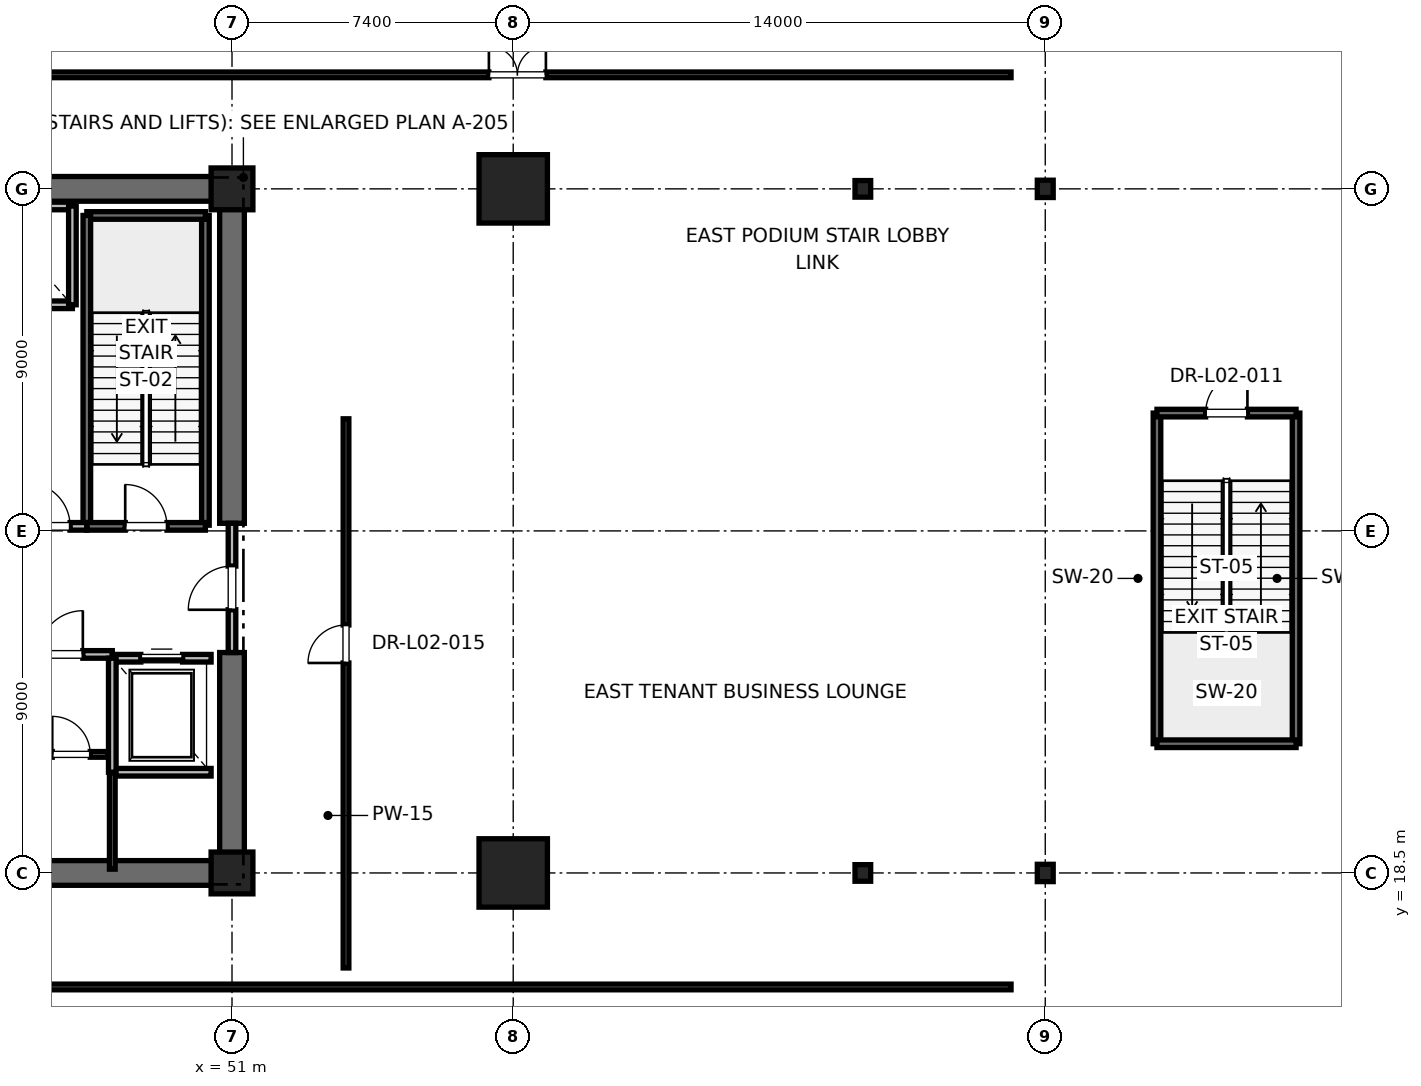
"""IFC4 building model, lengths in metres.
Left out: names, types, materials, properties, quantities, classifications, styles, units other than length and angle.
Written with IfcOpenShell. Run it as: python <this file> out.ifc"""

import sys

from ifc_helpers import new_model, si_unit, direction, frame, frame_2d, origin, origin_2d, place, context, subcontext, project, spatial, rectangle, i_section, extrude, element, fill, save


model = new_model("IFC4")
c1 = context("Model", 3, precision=1e-05, world=origin(), true_north=direction((0.0, 1.0)))
c2 = subcontext(c1, "Body", "Model", "MODEL_VIEW")
j1 = project(units=[si_unit("LENGTHUNIT", "METRE"), si_unit("PLANEANGLEUNIT", "RADIAN")], contexts=[c1])
p1 = place(None, origin())
s1 = spatial("IfcSite", under=j1, at=p1, CompositionType="ELEMENT")
p2 = place(p1, origin())
s2 = spatial("IfcBuilding", under=s1, at=p2, CompositionType="ELEMENT")
p3 = place(p2, frame((0.0, 0.0, 11.2)))
s3 = spatial("IfcBuildingStorey", under=s2, at=p3, CompositionType="ELEMENT", Elevation=11.2)
for number, where, z_axis, x_axis in (
    (1, (58.4, 18.5, 0.0), (0.0, 0.0, 1.0), (1.0, 0.0, 0.0)),
    (2, (58.4, 36.5, 0.0), (0.0, 0.0, 1.0), (1.0, 0.0, 0.0)),
):
    element("IfcColumn", number, at=place(p3, frame(where, z_axis=z_axis, x_axis=x_axis)), inside=s3, PredefinedType="COLUMN", context=c2, shape_type="SweptSolid", body=[
        extrude(rectangle(XDim=1.8, YDim=1.8, at=origin_2d()), origin(), (0.0, 0.0, 1.0), 5.2),
    ])
for number, where, z_axis, x_axis in (
    (3, (67.6, 18.5, 0.0), (0.0, 0.0, 1.0), (1.0, 0.0, 0.0)),
    (4, (67.6, 36.5, 0.0), (0.0, 0.0, 1.0), (1.0, 0.0, 0.0)),
):
    element("IfcColumn", number, at=place(p3, frame(where, z_axis=z_axis, x_axis=x_axis)), inside=s3, PredefinedType="COLUMN", context=c2, shape_type="SweptSolid", body=[
        extrude(i_section(OverallWidth=0.412, OverallDepth=0.437, WebThickness=0.036, FlangeThickness=0.058, FilletRadius=0.015, at=origin_2d()), origin(), (0.0, 0.0, 1.0), 5.2),
    ])
for number, where, z_axis, x_axis in (
    (5, (51.0, 18.5, 0.0), (0.0, 0.0, 1.0), (1.0, 0.0, 0.0)),
    (6, (51.0, 36.5, 0.0), (0.0, 0.0, 1.0), (1.0, 0.0, 0.0)),
):
    element("IfcColumn", number, at=place(p3, frame(where, z_axis=z_axis, x_axis=x_axis)), inside=s3, PredefinedType="PILASTER", context=c2, shape_type="SweptSolid", body=[
        extrude(rectangle(XDim=1.1, YDim=1.1, at=origin_2d()), origin(), (0.0, 0.0, 1.0), 5.2),
    ])
for number, where, z_axis, x_axis in (
    (7, (72.4, 18.5, 0.0), (0.0, 0.0, 1.0), (1.0, 0.0, 0.0)),
    (8, (72.4, 36.5, 0.0), (0.0, 0.0, 1.0), (1.0, 0.0, 0.0)),
):
    element("IfcColumn", number, at=place(p3, frame(where, z_axis=z_axis, x_axis=x_axis)), inside=s3, PredefinedType="COLUMN", context=c2, shape_type="SweptSolid", body=[
        extrude(i_section(OverallWidth=0.418, OverallDepth=0.456, WebThickness=0.042, FlangeThickness=0.067, FilletRadius=0.015, at=origin_2d()), origin(), (0.0, 0.0, 1.0), 5.2),
    ])
p4 = place(p3, frame((41.8, 18.5, 0.0), z_axis=(0.0, 0.0, 1.0), x_axis=(1.0, 0.0, 0.0)))
e9 = element("IfcWall", 9, at=p4, inside=s3, PredefinedType="SHEAR", context=c2, shape_type="SweptSolid", body=[
    extrude(rectangle(XDim=9.2, YDim=0.65, at=frame_2d((4.6, 0.0))), origin(), (0.0, 0.0, 1.0), 4.92),
])
for number, where, z_axis, x_axis in (
    (10, (45.2, 36.5, 0.0), (0.0, 0.0, 1.0), (1.0, 0.0, 0.0)),
    (11, (51.0, 18.5, 0.0), (0.0, 0.0, 1.0), (0.0, 1.0, 0.0)),
):
    element("IfcWall", number, at=place(p3, frame(where, z_axis=z_axis, x_axis=x_axis)), inside=s3, PredefinedType="SHEAR", context=c2, shape_type="SweptSolid", body=[
        extrude(rectangle(XDim=5.8, YDim=0.65, at=frame_2d((2.9, 0.0))), origin(), (0.0, 0.0, 1.0), 4.92),
    ])
p5 = place(p3, frame((51.0, 27.7, 0.0), z_axis=(0.0, 0.0, 1.0), x_axis=(0.0, 1.0, 0.0)))
e12 = element("IfcWall", 12, at=p5, inside=s3, PredefinedType="SHEAR", context=c2, shape_type="SweptSolid", body=[
    extrude(rectangle(XDim=8.8, YDim=0.65, at=frame_2d((4.4, 0.0))), origin(), (0.0, 0.0, 1.0), 4.92),
])
p6 = place(p3, frame((50.3, 27.65, 0.0), z_axis=(0.0, 0.0, 1.0), x_axis=(0.0, 1.0, 0.0)))
e13 = element("IfcWall", 13, at=p6, inside=s3, PredefinedType="SOLIDWALL", context=c2, shape_type="SweptSolid", body=[
    extrude(rectangle(XDim=8.15, YDim=0.2, at=frame_2d((4.075, 0.0))), origin(), (0.0, 0.0, 1.0), 4.92),
])
p7 = place(p3, frame((47.18, 35.8, 0.0), z_axis=(0.0, 0.0, 1.0), x_axis=(1.0, 0.0, 0.0)))
e14 = element("IfcWall", 14, at=p7, inside=s3, PredefinedType="SOLIDWALL", context=c2, shape_type="SweptSolid", body=[
    extrude(rectangle(XDim=3.12, YDim=0.2, at=frame_2d((1.56, 0.0))), origin(), (0.0, 0.0, 1.0), 4.92),
])
p8 = place(p3, frame((47.18, 27.62, 0.0), z_axis=(0.0, 0.0, 1.0), x_axis=(0.0, 1.0, 0.0)))
e15 = element("IfcWall", 15, at=p8, inside=s3, PredefinedType="SOLIDWALL", context=c2, shape_type="SweptSolid", body=[
    extrude(rectangle(XDim=8.18, YDim=0.2, at=frame_2d((4.09, 0.0))), origin(), (0.0, 0.0, 1.0), 4.92),
])
p9 = place(p3, frame((47.18, 27.62, 0.0), z_axis=(0.0, 0.0, 1.0), x_axis=(1.0, 0.0, 0.0)))
e16 = element("IfcWall", 16, at=p9, inside=s3, PredefinedType="SOLIDWALL", context=c2, shape_type="SweptSolid", body=[
    extrude(rectangle(XDim=3.12, YDim=0.2, at=frame_2d((1.56, 0.0))), origin(), (0.0, 0.0, 1.0), 4.92),
])
p10 = place(p9, frame((1.01, 0.0, 0.0)))
e17 = element("IfcOpeningElement", 17, at=p10, cuts=e16, PredefinedType="OPENING", context=c2, shape_type="SweptSolid", body=[
    extrude(rectangle(XDim=1.1, YDim=2.15, at=frame_2d((0.55, 1.075))), frame((0.0, 0.1, 0.0), z_axis=(0.0, -1.0, 0.0), x_axis=(1.0, 0.0, 0.0)), (0.0, 0.0, 1.0), 0.2),
])
for number, where, z_axis, x_axis in (
    (18, (75.34, 21.9, 0.0), (0.0, 0.0, 1.0), (0.0, 1.0, 0.0)),
    (19, (79.0, 21.9, 0.0), (0.0, 0.0, 1.0), (0.0, 1.0, 0.0)),
):
    element("IfcWall", number, at=place(p3, frame(where, z_axis=z_axis, x_axis=x_axis)), inside=s3, PredefinedType="SOLIDWALL", context=c2, shape_type="SweptSolid", body=[
        extrude(rectangle(XDim=8.7, YDim=0.2, at=frame_2d((4.35, 0.0))), origin(), (0.0, 0.0, 1.0), 4.92),
    ])
p11 = place(p3, frame((75.34, 30.6, 0.0), z_axis=(0.0, 0.0, 1.0), x_axis=(1.0, 0.0, 0.0)))
e20 = element("IfcWall", 20, at=p11, inside=s3, PredefinedType="SOLIDWALL", context=c2, shape_type="SweptSolid", body=[
    extrude(rectangle(XDim=3.66, YDim=0.2, at=frame_2d((1.83, 0.0))), origin(), (0.0, 0.0, 1.0), 4.92),
])
p12 = place(p11, frame((1.28, 0.0, 0.0)))
e21 = element("IfcOpeningElement", 21, at=p12, cuts=e20, PredefinedType="OPENING", context=c2, shape_type="SweptSolid", body=[
    extrude(rectangle(XDim=1.1, YDim=2.15, at=frame_2d((0.55, 1.075))), frame((0.0, 0.1, 0.0), z_axis=(0.0, -1.0, 0.0), x_axis=(1.0, 0.0, 0.0)), (0.0, 0.0, 1.0), 0.2),
])
p13 = place(p3, frame((75.34, 21.9, 0.0), z_axis=(0.0, 0.0, 1.0), x_axis=(1.0, 0.0, 0.0)))
e22 = element("IfcWall", 22, at=p13, inside=s3, PredefinedType="SOLIDWALL", context=c2, shape_type="SweptSolid", body=[
    extrude(rectangle(XDim=3.66, YDim=0.2, at=frame_2d((1.83, 0.0))), origin(), (0.0, 0.0, 1.0), 4.92),
])
p14 = place(p3, frame((45.15, 24.25, 0.0), z_axis=(0.0, 0.0, 1.0), x_axis=(1.0, 0.0, 0.0)))
e23 = element("IfcWall", 23, at=p14, inside=s3, PredefinedType="PARTITIONING", context=c2, shape_type="SweptSolid", body=[
    extrude(rectangle(XDim=2.7, YDim=0.2, at=frame_2d((1.35, 0.0))), origin(), (0.0, 0.0, 1.0), 4.92),
])
p15 = place(p14, frame((0.775, 0.0, 0.0)))
e24 = element("IfcOpeningElement", 24, at=p15, cuts=e23, PredefinedType="OPENING", context=c2, shape_type="SweptSolid", body=[
    extrude(rectangle(XDim=1.15, YDim=2.2, at=frame_2d((0.575, 1.1))), frame((0.0, 0.1, 0.0), z_axis=(0.0, -1.0, 0.0), x_axis=(1.0, 0.0, 0.0)), (0.0, 0.0, 1.0), 0.2),
])
p16 = place(p3, frame((45.15, 27.62, 0.0), z_axis=(0.0, 0.0, 1.0), x_axis=(1.0, 0.0, 0.0)))
e25 = element("IfcWall", 25, at=p16, inside=s3, PredefinedType="PARTITIONING", context=c2, shape_type="SweptSolid", body=[
    extrude(rectangle(XDim=2.03, YDim=0.2, at=frame_2d((1.015, 0.0))), origin(), (0.0, 0.0, 1.0), 4.92),
])
p17 = place(p16, frame((0.44, 0.0, 0.0)))
e26 = element("IfcOpeningElement", 26, at=p17, cuts=e25, PredefinedType="OPENING", context=c2, shape_type="SweptSolid", body=[
    extrude(rectangle(XDim=1.15, YDim=2.2, at=frame_2d((0.575, 1.1))), frame((0.0, 0.1, 0.0), z_axis=(0.0, -1.0, 0.0), x_axis=(1.0, 0.0, 0.0)), (0.0, 0.0, 1.0), 0.2),
])
p18 = place(p3, frame((51.0, 24.3, 0.0), z_axis=(0.0, 0.0, 1.0), x_axis=(0.0, 1.0, 0.0)))
e27 = element("IfcWall", 27, at=p18, inside=s3, PredefinedType="PARTITIONING", context=c2, shape_type="SweptSolid", body=[
    extrude(rectangle(XDim=3.4, YDim=0.2, at=frame_2d((1.7, 0.0))), origin(), (0.0, 0.0, 1.0), 3.7),
])
p19 = place(p18, frame((1.125, 0.0, 0.0)))
e28 = element("IfcOpeningElement", 28, at=p19, cuts=e27, PredefinedType="OPENING", context=c2, shape_type="SweptSolid", body=[
    extrude(rectangle(XDim=1.15, YDim=2.2, at=frame_2d((0.575, 1.1))), frame((0.0, 0.1, 0.0), z_axis=(0.0, -1.0, 0.0), x_axis=(1.0, 0.0, 0.0)), (0.0, 0.0, 1.0), 0.2),
])
p20 = place(p3, frame((47.85, 21.15, 0.0), z_axis=(0.0, 0.0, 1.0), x_axis=(1.0, 0.0, 0.0)))
e29 = element("IfcWall", 29, at=p20, inside=s3, PredefinedType="SOLIDWALL", context=c2, shape_type="SweptSolid", body=[
    extrude(rectangle(XDim=2.6, YDim=0.2, at=frame_2d((1.3, 0.0))), origin(), (0.0, 0.0, 1.0), 4.92),
])
p21 = place(p3, frame((50.45, 24.15, 0.0), z_axis=(0.0, 0.0, 1.0), x_axis=(-1.0, 0.0, 0.0)))
e30 = element("IfcWall", 30, at=p21, inside=s3, PredefinedType="SOLIDWALL", context=c2, shape_type="SweptSolid", body=[
    extrude(rectangle(XDim=2.6, YDim=0.2, at=frame_2d((1.3, 0.0))), origin(), (0.0, 0.0, 1.0), 3.7),
])
p22 = place(p21, frame((0.75, 0.0, 0.0)))
e31 = element("IfcOpeningElement", 31, at=p22, cuts=e30, PredefinedType="OPENING", context=c2, shape_type="SweptSolid", body=[
    extrude(rectangle(XDim=1.1, YDim=2.2, at=frame_2d((0.55, 1.1))), frame((0.0, 0.1, 0.0), z_axis=(0.0, -1.0, 0.0), x_axis=(1.0, 0.0, 0.0)), (0.0, 0.0, 1.0), 0.2),
])
p23 = place(p3, frame((47.85, 24.15, 0.0), z_axis=(0.0, 0.0, 1.0), x_axis=(0.0, -1.0, 0.0)))
e32 = element("IfcWall", 32, at=p23, inside=s3, PredefinedType="SOLIDWALL", context=c2, shape_type="SweptSolid", body=[
    extrude(rectangle(XDim=3.0, YDim=0.2, at=frame_2d((1.5, 0.0))), origin(), (0.0, 0.0, 1.0), 4.92),
])
p24 = place(p3, frame((44.5, 33.45, 0.0), z_axis=(0.0, 0.0, 1.0), x_axis=(1.0, 0.0, 0.0)))
e33 = element("IfcWall", 33, at=p24, inside=s3, PredefinedType="SOLIDWALL", context=c2, shape_type="SweptSolid", body=[
    extrude(rectangle(XDim=2.3, YDim=0.2, at=frame_2d((1.15, 0.0))), origin(), (0.0, 0.0, 1.0), 4.92),
])
p25 = place(p3, frame((46.8, 36.05, 0.0), z_axis=(0.0, 0.0, 1.0), x_axis=(-1.0, 0.0, 0.0)))
e34 = element("IfcWall", 34, at=p25, inside=s3, PredefinedType="SOLIDWALL", context=c2, shape_type="SweptSolid", body=[
    extrude(rectangle(XDim=2.3, YDim=0.2, at=frame_2d((1.15, 0.0))), origin(), (0.0, 0.0, 1.0), 3.7),
])
p26 = place(p3, frame((46.8, 33.45, 0.0), z_axis=(0.0, 0.0, 1.0), x_axis=(0.0, 1.0, 0.0)))
e35 = element("IfcWall", 35, at=p26, inside=s3, PredefinedType="SOLIDWALL", context=c2, shape_type="SweptSolid", body=[
    extrude(rectangle(XDim=2.6, YDim=0.2, at=frame_2d((1.3, 0.0))), origin(), (0.0, 0.0, 1.0), 4.92),
])
p27 = place(p3, frame((47.85, 18.6, 0.0), z_axis=(0.0, 0.0, 1.0), x_axis=(0.0, 1.0, 0.0)))
e36 = element("IfcWall", 36, at=p27, inside=s3, PredefinedType="PARTITIONING", context=c2, shape_type="SweptSolid", body=[
    extrude(rectangle(XDim=2.54, YDim=0.15, at=frame_2d((1.27, 0.0))), origin(), (0.0, 0.0, 1.0), 2.85),
])
p28 = place(p3, frame((45.8, 21.62, 0.0), z_axis=(0.0, 0.0, 1.0), x_axis=(1.0, 0.0, 0.0)))
e37 = element("IfcWall", 37, at=p28, inside=s3, PredefinedType="PARTITIONING", context=c2, shape_type="SweptSolid", body=[
    extrude(rectangle(XDim=1.94, YDim=0.15, at=frame_2d((0.97, 0.0))), origin(), (0.0, 0.0, 1.0), 2.85),
])
p29 = place(p28, frame((0.47, 0.0, 0.0)))
e38 = element("IfcOpeningElement", 38, at=p29, cuts=e37, PredefinedType="OPENING", context=c2, shape_type="SweptSolid", body=[
    extrude(rectangle(XDim=1.0, YDim=2.15, at=frame_2d((0.5, 1.075))), frame((0.0, 0.075, 0.0), z_axis=(0.0, -1.0, 0.0), x_axis=(1.0, 0.0, 0.0)), (0.0, 0.0, 1.0), 0.15),
])
p30 = place(p3, frame((9.5, 15.5, 0.0), z_axis=(0.0, 0.0, 1.0), x_axis=(1.0, 0.0, 0.0)))
e39 = element("IfcWall", 39, at=p30, inside=s3, PredefinedType="PARTITIONING", context=c2, shape_type="SweptSolid", body=[
    extrude(rectangle(XDim=62.0, YDim=0.15, at=frame_2d((31.0, 0.0))), origin(), (0.0, 0.0, 1.0), 2.85),
])
p31 = place(p30, frame((30.5, 0.0, 0.0)))
e40 = element("IfcOpeningElement", 40, at=p31, cuts=e39, PredefinedType="OPENING", context=c2, shape_type="SweptSolid", body=[
    extrude(rectangle(XDim=1.0, YDim=2.15, at=frame_2d((0.5, 1.075))), frame((0.0, 0.075, 0.0), z_axis=(0.0, -1.0, 0.0), x_axis=(1.0, 0.0, 0.0)), (0.0, 0.0, 1.0), 0.15),
])
p32 = place(p3, frame((45.52, 39.5, 0.0), z_axis=(0.0, 0.0, 1.0), x_axis=(1.0, 0.0, 0.0)))
e41 = element("IfcWall", 41, at=p32, inside=s3, PredefinedType="PARTITIONING", context=c2, shape_type="SweptSolid", body=[
    extrude(rectangle(XDim=25.98, YDim=0.15, at=frame_2d((12.99, 0.0))), origin(), (0.0, 0.0, 1.0), 2.85),
])
p33 = place(p32, frame((12.24, 0.0, 0.0)))
e42 = element("IfcOpeningElement", 42, at=p33, cuts=e41, PredefinedType="OPENING", context=c2, shape_type="SweptSolid", body=[
    extrude(rectangle(XDim=1.5, YDim=2.25, at=frame_2d((0.75, 1.125))), frame((0.0, 0.075, 0.0), z_axis=(0.0, -1.0, 0.0), x_axis=(1.0, 0.0, 0.0)), (0.0, 0.0, 1.0), 0.15),
])
p34 = place(p3, frame((54.0, 16.0, 0.0), z_axis=(0.0, 0.0, 1.0), x_axis=(0.0, 1.0, 0.0)))
e43 = element("IfcWall", 43, at=p34, inside=s3, PredefinedType="PARTITIONING", context=c2, shape_type="SweptSolid", body=[
    extrude(rectangle(XDim=14.45, YDim=0.15, at=frame_2d((7.225, 0.0))), origin(), (0.0, 0.0, 1.0), 2.85),
])
p35 = place(p34, frame((8.025, 0.0, 0.0)))
e44 = element("IfcOpeningElement", 44, at=p35, cuts=e43, PredefinedType="OPENING", context=c2, shape_type="SweptSolid", body=[
    extrude(rectangle(XDim=1.0, YDim=2.15, at=frame_2d((0.5, 1.075))), frame((0.0, 0.075, 0.0), z_axis=(0.0, -1.0, 0.0), x_axis=(1.0, 0.0, 0.0)), (0.0, 0.0, 1.0), 0.15),
])
p36 = place(p10, origin())
e45 = element("IfcDoor", 45, at=p36, inside=s3, OperationType="SINGLE_SWING_LEFT", PredefinedType="DOOR", context=c2, shape_type="SweptSolid", body=[
    extrude(rectangle(XDim=1.1, YDim=2.15, at=frame_2d((0.55, 1.075))), frame((0.0, 0.025, 0.0), z_axis=(0.0, -1.0, 0.0), x_axis=(1.0, 0.0, 0.0)), (0.0, 0.0, 1.0), 0.05),
])
fill(e17, e45)
p37 = place(p12, origin())
e46 = element("IfcDoor", 46, at=p37, inside=s3, OperationType="SINGLE_SWING_RIGHT", PredefinedType="DOOR", context=c2, shape_type="SweptSolid", body=[
    extrude(rectangle(XDim=1.1, YDim=2.15, at=frame_2d((0.55, 1.075))), frame((0.0, 0.025, 0.0), z_axis=(0.0, -1.0, 0.0), x_axis=(1.0, 0.0, 0.0)), (0.0, 0.0, 1.0), 0.05),
])
fill(e21, e46)
p38 = place(p15, origin())
e47 = element("IfcDoor", 47, at=p38, inside=s3, OperationType="SINGLE_SWING_RIGHT", PredefinedType="DOOR", context=c2, shape_type="SweptSolid", body=[
    extrude(rectangle(XDim=1.15, YDim=2.2, at=frame_2d((0.575, 1.1))), frame((0.0, 0.025, 0.0), z_axis=(0.0, -1.0, 0.0), x_axis=(1.0, 0.0, 0.0)), (0.0, 0.0, 1.0), 0.05),
])
fill(e24, e47)
p39 = place(p17, origin())
e48 = element("IfcDoor", 48, at=p39, inside=s3, OperationType="SINGLE_SWING_LEFT", PredefinedType="DOOR", context=c2, shape_type="SweptSolid", body=[
    extrude(rectangle(XDim=1.15, YDim=2.2, at=frame_2d((0.575, 1.1))), frame((0.0, 0.025, 0.0), z_axis=(0.0, -1.0, 0.0), x_axis=(1.0, 0.0, 0.0)), (0.0, 0.0, 1.0), 0.05),
])
fill(e26, e48)
p40 = place(p19, origin())
e49 = element("IfcDoor", 49, at=p40, inside=s3, OperationType="SINGLE_SWING_LEFT", PredefinedType="DOOR", context=c2, shape_type="SweptSolid", body=[
    extrude(rectangle(XDim=1.15, YDim=2.2, at=frame_2d((0.575, 1.1))), frame((0.0, 0.025, 0.0), z_axis=(0.0, -1.0, 0.0), x_axis=(1.0, 0.0, 0.0)), (0.0, 0.0, 1.0), 0.05),
])
fill(e28, e49)
p41 = place(p22, origin())
e50 = element("IfcDoor", 50, at=p41, inside=s3, OperationType="SLIDING_TO_RIGHT", PredefinedType="DOOR", context=c2, shape_type="SweptSolid", body=[
    extrude(rectangle(XDim=1.1, YDim=2.2, at=frame_2d((0.55, 1.1))), frame((0.0, 0.025, 0.0), z_axis=(0.0, -1.0, 0.0), x_axis=(1.0, 0.0, 0.0)), (0.0, 0.0, 1.0), 0.05),
])
fill(e31, e50)
p42 = place(p29, origin())
e51 = element("IfcDoor", 51, at=p42, inside=s3, OperationType="SINGLE_SWING_LEFT", PredefinedType="DOOR", context=c2, shape_type="SweptSolid", body=[
    extrude(rectangle(XDim=1.0, YDim=2.15, at=frame_2d((0.5, 1.075))), frame((0.0, 0.025, 0.0), z_axis=(0.0, -1.0, 0.0), x_axis=(1.0, 0.0, 0.0)), (0.0, 0.0, 1.0), 0.05),
])
fill(e38, e51)
p43 = place(p33, origin())
e52 = element("IfcDoor", 52, at=p43, inside=s3, OperationType="DOUBLE_DOOR_SINGLE_SWING", PredefinedType="DOOR", context=c2, shape_type="SweptSolid", body=[
    extrude(rectangle(XDim=1.5, YDim=2.25, at=frame_2d((0.75, 1.125))), frame((0.0, 0.025, 0.0), z_axis=(0.0, -1.0, 0.0), x_axis=(1.0, 0.0, 0.0)), (0.0, 0.0, 1.0), 0.05),
])
fill(e42, e52)
p44 = place(p35, origin())
e53 = element("IfcDoor", 53, at=p44, inside=s3, OperationType="SINGLE_SWING_LEFT", PredefinedType="DOOR", context=c2, shape_type="SweptSolid", body=[
    extrude(rectangle(XDim=1.0, YDim=2.15, at=frame_2d((0.5, 1.075))), frame((0.0, 0.025, 0.0), z_axis=(0.0, -1.0, 0.0), x_axis=(1.0, 0.0, 0.0)), (0.0, 0.0, 1.0), 0.05),
])
fill(e44, e53)
save(model, sys.argv[1])
